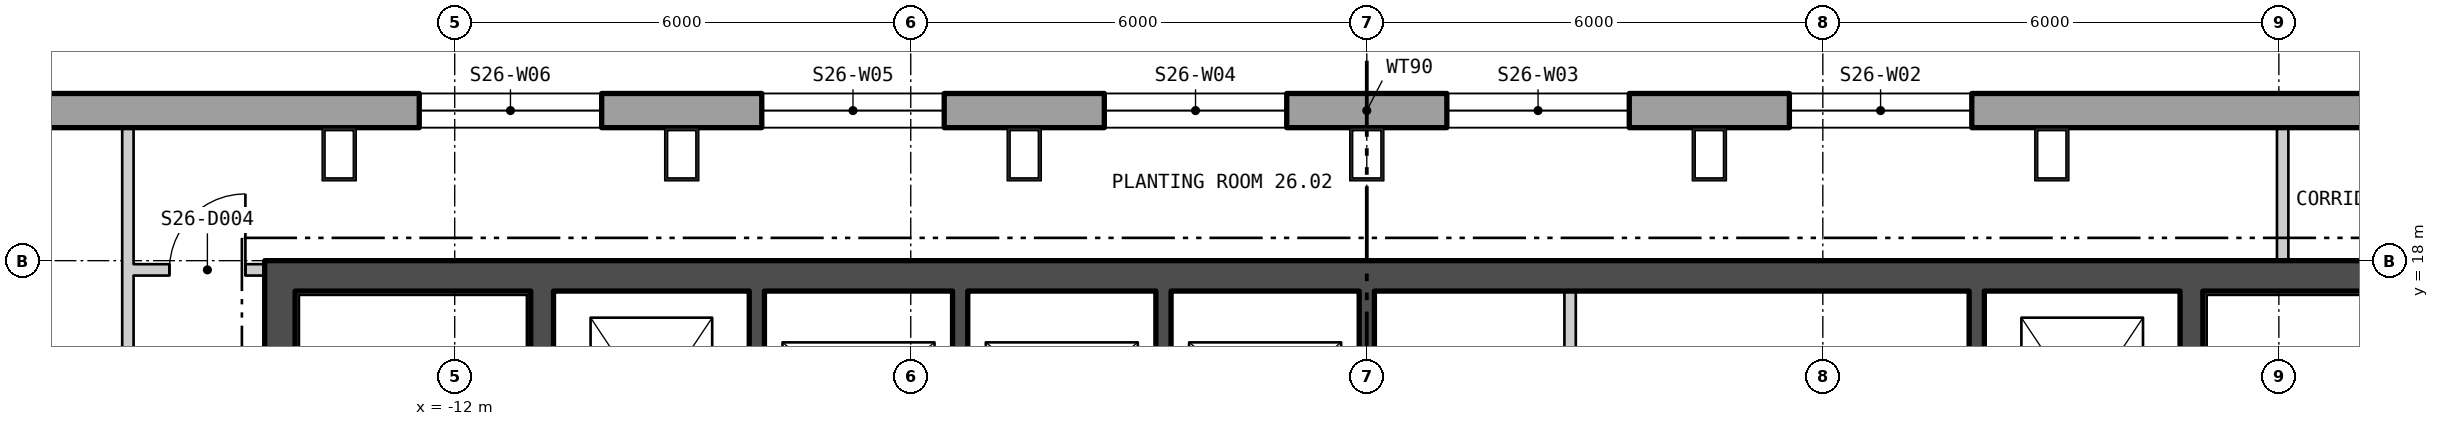
"""IFC4 building model, lengths in metres.
Left out: names, types, materials, properties, quantities, classifications, styles, units other than length and angle.
Written with IfcOpenShell. Run it as: python <this file> out.ifc"""

import sys

from ifc_helpers import new_model, si_unit, direction, frame, frame_2d, origin, origin_2d, place, context, subcontext, project, spatial, polyline, rectangle, hollow_rectangle, outline, extrude, element, fill, save


model = new_model("IFC4")
c1 = context("Model", 3, precision=1e-05, world=origin(), true_north=direction((0.0, 1.0)))
c2 = subcontext(c1, "Body", "Model", "MODEL_VIEW")
j1 = project(units=[si_unit("LENGTHUNIT", "METRE"), si_unit("PLANEANGLEUNIT", "RADIAN")], contexts=[c1])
p1 = place(None, origin())
s1 = spatial("IfcSite", under=j1, at=p1, CompositionType="ELEMENT")
p2 = place(p1, origin())
s2 = spatial("IfcBuilding", under=s1, at=p2, CompositionType="ELEMENT")
p3 = place(p2, frame((0.0, 0.0, 329.4)))
s3 = spatial("IfcBuildingStorey", under=s2, at=p3, CompositionType="ELEMENT", Elevation=329.4)
for number, where, z_axis, x_axis in (
    (1, (9.013, 19.4, 0.0), (0.0, 0.0, 1.0), (-1.0, 0.0, 0.0)),
    (2, (4.507, 19.4, 0.0), (0.0, 0.0, 1.0), (-1.0, 0.0, 0.0)),
    (3, (0.0, 19.4, 0.0), (0.0, 0.0, 1.0), (-1.0, 0.0, 0.0)),
    (4, (-4.507, 19.4, 0.0), (0.0, 0.0, 1.0), (-1.0, 0.0, 0.0)),
    (5, (-9.013, 19.4, 0.0), (0.0, 0.0, 1.0), (-1.0, 0.0, 0.0)),
    (6, (-13.52, 19.4, 0.0), (0.0, 0.0, 1.0), (-1.0, 0.0, 0.0)),
):
    element("IfcColumn", number, at=place(p3, frame(where, z_axis=z_axis, x_axis=x_axis)), inside=s3, PredefinedType="COLUMN", context=c2, shape_type="SweptSolid", body=[
        extrude(hollow_rectangle(XDim=0.45, YDim=0.7, WallThickness=0.04, at=origin_2d()), origin(), (0.0, 0.0, 1.0), 4.2),
    ])
p4 = place(p3, frame((22.865, 19.975, -0.4), z_axis=(0.0, 0.0, 1.0), x_axis=(-1.0, 0.0, 0.0)))
e7 = element("IfcWall", 7, at=p4, inside=s3, PredefinedType="SOLIDWALL", context=c2, shape_type="SweptSolid", body=[
    extrude(outline(polyline([(-0.13, -0.225), (45.86, -0.225), (45.6, 0.225), (0.13, 0.225), (-0.13, -0.225)])), origin(), (0.0, 0.0, 1.0), 4.2),
])
p5 = place(p4, frame((1.424, 0.0, 1.3)))
e8 = element("IfcOpeningElement", 8, at=p5, cuts=e7, PredefinedType="OPENING", context=c2, shape_type="SweptSolid", body=[
    extrude(rectangle(XDim=2.4, YDim=2.3, at=frame_2d((1.2, 1.15))), frame((0.0, 0.235, 0.0), z_axis=(0.0, -1.0, 0.0), x_axis=(1.0, 0.0, 0.0)), (0.0, 0.0, 1.0), 0.47),
])
p6 = place(p4, frame((14.905, 0.0, 1.3)))
e9 = element("IfcOpeningElement", 9, at=p6, cuts=e7, PredefinedType="OPENING", context=c2, shape_type="SweptSolid", body=[
    extrude(rectangle(XDim=2.4, YDim=2.3, at=frame_2d((1.2, 1.15))), frame((0.0, 0.235, 0.0), z_axis=(0.0, -1.0, 0.0), x_axis=(1.0, 0.0, 0.0)), (0.0, 0.0, 1.0), 0.47),
])
p7 = place(p4, frame((19.412, 0.0, 1.3)))
e10 = element("IfcOpeningElement", 10, at=p7, cuts=e7, PredefinedType="OPENING", context=c2, shape_type="SweptSolid", body=[
    extrude(rectangle(XDim=2.4, YDim=2.3, at=frame_2d((1.2, 1.15))), frame((0.0, 0.235, 0.0), z_axis=(0.0, -1.0, 0.0), x_axis=(1.0, 0.0, 0.0)), (0.0, 0.0, 1.0), 0.47),
])
p8 = place(p4, frame((23.918, 0.0, 1.3)))
e11 = element("IfcOpeningElement", 11, at=p8, cuts=e7, PredefinedType="OPENING", context=c2, shape_type="SweptSolid", body=[
    extrude(rectangle(XDim=2.4, YDim=2.3, at=frame_2d((1.2, 1.15))), frame((0.0, 0.235, 0.0), z_axis=(0.0, -1.0, 0.0), x_axis=(1.0, 0.0, 0.0)), (0.0, 0.0, 1.0), 0.47),
])
p9 = place(p4, frame((28.425, 0.0, 1.3)))
e12 = element("IfcOpeningElement", 12, at=p9, cuts=e7, PredefinedType="OPENING", context=c2, shape_type="SweptSolid", body=[
    extrude(rectangle(XDim=2.4, YDim=2.3, at=frame_2d((1.2, 1.15))), frame((0.0, 0.235, 0.0), z_axis=(0.0, -1.0, 0.0), x_axis=(1.0, 0.0, 0.0)), (0.0, 0.0, 1.0), 0.47),
])
p10 = place(p4, frame((32.932, 0.0, 1.3)))
e13 = element("IfcOpeningElement", 13, at=p10, cuts=e7, PredefinedType="OPENING", context=c2, shape_type="SweptSolid", body=[
    extrude(rectangle(XDim=2.4, YDim=2.3, at=frame_2d((1.2, 1.15))), frame((0.0, 0.235, 0.0), z_axis=(0.0, -1.0, 0.0), x_axis=(1.0, 0.0, 0.0)), (0.0, 0.0, 1.0), 0.47),
])
p11 = place(p4, frame((41.907, 0.0, 1.3)))
e14 = element("IfcOpeningElement", 14, at=p11, cuts=e7, PredefinedType="OPENING", context=c2, shape_type="SweptSolid", body=[
    extrude(rectangle(XDim=2.4, YDim=2.3, at=frame_2d((1.2, 1.15))), frame((0.0, 0.235, 0.0), z_axis=(0.0, -1.0, 0.0), x_axis=(1.0, 0.0, 0.0)), (0.0, 0.0, 1.0), 0.47),
])
p12 = place(p3, frame((-14.5, 17.8, 0.0), z_axis=(0.0, 0.0, 1.0), x_axis=(1.0, 0.0, 0.0)))
e15 = element("IfcWall", 15, at=p12, inside=s3, PredefinedType="SHEAR", context=c2, shape_type="SweptSolid", body=[
    extrude(rectangle(XDim=29.0, YDim=0.4, at=frame_2d((14.5, 0.0))), origin(), (0.0, 0.0, 1.0), 4.0),
])
p13 = place(p3, frame((-14.3, 4.4, 0.0), z_axis=(0.0, 0.0, 1.0), x_axis=(0.0, 1.0, 0.0)))
e16 = element("IfcWall", 16, at=p13, inside=s3, PredefinedType="SHEAR", context=c2, shape_type="SweptSolid", body=[
    extrude(rectangle(XDim=13.2, YDim=0.4, at=frame_2d((6.6, 0.0))), origin(), (0.0, 0.0, 1.0), 4.0),
])
p14 = place(p13, frame((3.05, 0.0, 0.0)))
e17 = element("IfcOpeningElement", 17, at=p14, cuts=e16, PredefinedType="OPENING", context=c2, shape_type="SweptSolid", body=[
    extrude(rectangle(XDim=1.5, YDim=2.1, at=frame_2d((0.75, 1.05))), frame((0.0, 0.21, 0.0), z_axis=(0.0, -1.0, 0.0), x_axis=(1.0, 0.0, 0.0)), (0.0, 0.0, 1.0), 0.42),
])
p15 = place(p3, frame((-10.85, 4.4, 0.0), z_axis=(0.0, 0.0, 1.0), x_axis=(0.0, 1.0, 0.0)))
e18 = element("IfcWall", 18, at=p15, inside=s3, PredefinedType="SHEAR", context=c2, shape_type="SweptSolid", body=[
    extrude(rectangle(XDim=13.2, YDim=0.3, at=frame_2d((6.6, 0.0))), origin(), (0.0, 0.0, 1.0), 4.0),
])
p16 = place(p15, frame((1.575, 0.0, 0.0)))
e19 = element("IfcOpeningElement", 19, at=p16, cuts=e18, PredefinedType="OPENING", context=c2, shape_type="SweptSolid", body=[
    extrude(rectangle(XDim=1.25, YDim=2.1, at=frame_2d((0.625, 1.05))), frame((0.0, 0.16, 0.0), z_axis=(0.0, -1.0, 0.0), x_axis=(1.0, 0.0, 0.0)), (0.0, 0.0, 1.0), 0.32),
])
p17 = place(p15, frame((0.4, 0.0, 0.0)))
e20 = element("IfcOpeningElement", 20, at=p17, cuts=e18, PredefinedType="OPENING", context=c2, shape_type="SweptSolid", body=[
    extrude(rectangle(XDim=0.9, YDim=2.1, at=frame_2d((0.45, 1.05))), frame((0.0, 0.16, 0.0), z_axis=(0.0, -1.0, 0.0), x_axis=(1.0, 0.0, 0.0)), (0.0, 0.0, 1.0), 0.32),
])
p18 = place(p3, frame((10.85, 4.4, 0.0), z_axis=(0.0, 0.0, 1.0), x_axis=(0.0, 1.0, 0.0)))
e21 = element("IfcWall", 21, at=p18, inside=s3, PredefinedType="SHEAR", context=c2, shape_type="SweptSolid", body=[
    extrude(rectangle(XDim=13.2, YDim=0.3, at=frame_2d((6.6, 0.0))), origin(), (0.0, 0.0, 1.0), 4.0),
])
p19 = place(p18, frame((1.575, 0.0, 0.0)))
e22 = element("IfcOpeningElement", 22, at=p19, cuts=e21, PredefinedType="OPENING", context=c2, shape_type="SweptSolid", body=[
    extrude(rectangle(XDim=1.25, YDim=2.1, at=frame_2d((0.625, 1.05))), frame((0.0, 0.16, 0.0), z_axis=(0.0, -1.0, 0.0), x_axis=(1.0, 0.0, 0.0)), (0.0, 0.0, 1.0), 0.32),
])
p20 = place(p18, frame((0.4, 0.0, 0.0)))
e23 = element("IfcOpeningElement", 23, at=p20, cuts=e21, PredefinedType="OPENING", context=c2, shape_type="SweptSolid", body=[
    extrude(rectangle(XDim=0.9, YDim=2.1, at=frame_2d((0.45, 1.05))), frame((0.0, 0.16, 0.0), z_axis=(0.0, -1.0, 0.0), x_axis=(1.0, 0.0, 0.0)), (0.0, 0.0, 1.0), 0.32),
])
for number, where, z_axis, x_axis in (
    (24, (-8.025, 14.7, 0.0), (0.0, 0.0, 1.0), (0.0, 1.0, 0.0)),
    (25, (-5.35, 14.7, 0.0), (0.0, 0.0, 1.0), (0.0, 1.0, 0.0)),
    (26, (-2.675, 14.7, 0.0), (0.0, 0.0, 1.0), (0.0, 1.0, 0.0)),
    (27, (0.0, 14.7, 0.0), (0.0, 0.0, 1.0), (0.0, 1.0, 0.0)),
):
    element("IfcWall", number, at=place(p3, frame(where, z_axis=z_axis, x_axis=x_axis)), inside=s3, PredefinedType="SHEAR", context=c2, shape_type="SweptSolid", body=[
        extrude(rectangle(XDim=2.9, YDim=0.2, at=frame_2d((1.45, 0.0))), origin(), (0.0, 0.0, 1.0), 4.0),
    ])
p21 = place(p3, frame((2.675, 14.7, 0.0), z_axis=(0.0, 0.0, 1.0), x_axis=(0.0, 1.0, 0.0)))
e28 = element("IfcWall", 28, at=p21, inside=s3, PredefinedType="PARTITIONING", context=c2, shape_type="SweptSolid", body=[
    extrude(rectangle(XDim=2.9, YDim=0.15, at=frame_2d((1.45, 0.0))), origin(), (0.0, 0.0, 1.0), 4.0),
])
p22 = place(p3, frame((8.025, 14.7, 0.0), z_axis=(0.0, 0.0, 1.0), x_axis=(0.0, 1.0, 0.0)))
e29 = element("IfcWall", 29, at=p22, inside=s3, PredefinedType="SHEAR", context=c2, shape_type="SweptSolid", body=[
    extrude(rectangle(XDim=2.9, YDim=0.2, at=frame_2d((1.45, 0.0))), origin(), (0.0, 0.0, 1.0), 4.0),
])
p23 = place(p3, frame((-16.3, 2.472, 0.0), z_axis=(0.0, 0.0, 1.0), x_axis=(0.0, 1.0, 0.0)))
e30 = element("IfcWall", 30, at=p23, inside=s3, PredefinedType="PARTITIONING", context=c2, shape_type="SweptSolid", body=[
    extrude(rectangle(XDim=17.276, YDim=0.15, at=frame_2d((8.638, 0.0))), origin(), (0.0, 0.0, 1.0), 4.0),
])
p24 = place(p23, frame((3.704, 0.0, 0.0)))
e31 = element("IfcOpeningElement", 31, at=p24, cuts=e30, PredefinedType="OPENING", context=c2, shape_type="SweptSolid", body=[
    extrude(rectangle(XDim=1.0, YDim=2.1, at=frame_2d((0.5, 1.05))), frame((0.0, 0.085, 0.0), z_axis=(0.0, -1.0, 0.0), x_axis=(1.0, 0.0, 0.0)), (0.0, 0.0, 1.0), 0.17),
])
p25 = place(p23, frame((9.413, 0.0, 0.0)))
e32 = element("IfcOpeningElement", 32, at=p25, cuts=e30, PredefinedType="OPENING", context=c2, shape_type="SweptSolid", body=[
    extrude(rectangle(XDim=1.0, YDim=2.1, at=frame_2d((0.5, 1.05))), frame((0.0, 0.085, 0.0), z_axis=(0.0, -1.0, 0.0), x_axis=(1.0, 0.0, 0.0)), (0.0, 0.0, 1.0), 0.17),
])
p26 = place(p23, frame((12.944, 0.0, 0.0)))
e33 = element("IfcOpeningElement", 33, at=p26, cuts=e30, PredefinedType="OPENING", context=c2, shape_type="SweptSolid", body=[
    extrude(rectangle(XDim=1.0, YDim=2.1, at=frame_2d((0.5, 1.05))), frame((0.0, 0.085, 0.0), z_axis=(0.0, -1.0, 0.0), x_axis=(1.0, 0.0, 0.0)), (0.0, 0.0, 1.0), 0.17),
])
p27 = place(p3, frame((-16.225, 17.879, 0.0), z_axis=(0.0, 0.0, 1.0), x_axis=(1.0, 0.0, 0.0)))
e34 = element("IfcWall", 34, at=p27, inside=s3, PredefinedType="PARTITIONING", context=c2, shape_type="SweptSolid", body=[
    extrude(rectangle(XDim=1.725, YDim=0.15, at=frame_2d((0.863, 0.0))), origin(), (0.0, 0.0, 1.0), 4.0),
])
p28 = place(p27, frame((0.471, 0.0, 0.0)))
e35 = element("IfcOpeningElement", 35, at=p28, cuts=e34, PredefinedType="OPENING", context=c2, shape_type="SweptSolid", body=[
    extrude(rectangle(XDim=1.0, YDim=2.1, at=frame_2d((0.5, 1.05))), frame((0.0, 0.085, 0.0), z_axis=(0.0, -1.0, 0.0), x_axis=(1.0, 0.0, 0.0)), (0.0, 0.0, 1.0), 0.17),
])
p29 = place(p3, frame((12.05, 18.0, 0.0), z_axis=(0.0, 0.0, 1.0), x_axis=(0.0, 1.0, 0.0)))
e36 = element("IfcWall", 36, at=p29, inside=s3, PredefinedType="PARTITIONING", context=c2, shape_type="SweptSolid", body=[
    extrude(rectangle(XDim=1.75, YDim=0.15, at=frame_2d((0.875, 0.0))), origin(), (0.0, 0.0, 1.0), 4.0),
])
p30 = place(p6, origin())
e37 = element("IfcWindow", 37, at=p30, inside=s3, PartitioningType="SINGLE_PANEL", PredefinedType="WINDOW", context=c2, shape_type="SweptSolid", body=[
    extrude(rectangle(XDim=2.4, YDim=2.3, at=frame_2d((1.2, 1.15))), frame((0.0, 0.105, 0.0), z_axis=(0.0, -1.0, 0.0), x_axis=(1.0, 0.0, 0.0)), (0.0, 0.0, 1.0), 0.06),
])
fill(e9, e37)
p31 = place(p7, origin())
e38 = element("IfcWindow", 38, at=p31, inside=s3, PartitioningType="SINGLE_PANEL", PredefinedType="WINDOW", context=c2, shape_type="SweptSolid", body=[
    extrude(rectangle(XDim=2.4, YDim=2.3, at=frame_2d((1.2, 1.15))), frame((0.0, 0.105, 0.0), z_axis=(0.0, -1.0, 0.0), x_axis=(1.0, 0.0, 0.0)), (0.0, 0.0, 1.0), 0.06),
])
fill(e10, e38)
p32 = place(p8, origin())
e39 = element("IfcWindow", 39, at=p32, inside=s3, PartitioningType="SINGLE_PANEL", PredefinedType="WINDOW", context=c2, shape_type="SweptSolid", body=[
    extrude(rectangle(XDim=2.4, YDim=2.3, at=frame_2d((1.2, 1.15))), frame((0.0, 0.105, 0.0), z_axis=(0.0, -1.0, 0.0), x_axis=(1.0, 0.0, 0.0)), (0.0, 0.0, 1.0), 0.06),
])
fill(e11, e39)
p33 = place(p9, origin())
e40 = element("IfcWindow", 40, at=p33, inside=s3, PartitioningType="SINGLE_PANEL", PredefinedType="WINDOW", context=c2, shape_type="SweptSolid", body=[
    extrude(rectangle(XDim=2.4, YDim=2.3, at=frame_2d((1.2, 1.15))), frame((0.0, 0.105, 0.0), z_axis=(0.0, -1.0, 0.0), x_axis=(1.0, 0.0, 0.0)), (0.0, 0.0, 1.0), 0.06),
])
fill(e12, e40)
p34 = place(p10, origin())
e41 = element("IfcWindow", 41, at=p34, inside=s3, PartitioningType="SINGLE_PANEL", PredefinedType="WINDOW", context=c2, shape_type="SweptSolid", body=[
    extrude(rectangle(XDim=2.4, YDim=2.3, at=frame_2d((1.2, 1.15))), frame((0.0, 0.105, 0.0), z_axis=(0.0, -1.0, 0.0), x_axis=(1.0, 0.0, 0.0)), (0.0, 0.0, 1.0), 0.06),
])
fill(e13, e41)
p35 = place(p28, origin())
e42 = element("IfcDoor", 42, at=p35, inside=s3, OperationType="SINGLE_SWING_LEFT", PredefinedType="DOOR", context=c2, shape_type="SweptSolid", body=[
    extrude(rectangle(XDim=1.0, YDim=2.1, at=frame_2d((0.5, 1.05))), frame((0.0, 0.025, 0.0), z_axis=(0.0, -1.0, 0.0), x_axis=(1.0, 0.0, 0.0)), (0.0, 0.0, 1.0), 0.05),
])
fill(e35, e42)
save(model, sys.argv[1])
